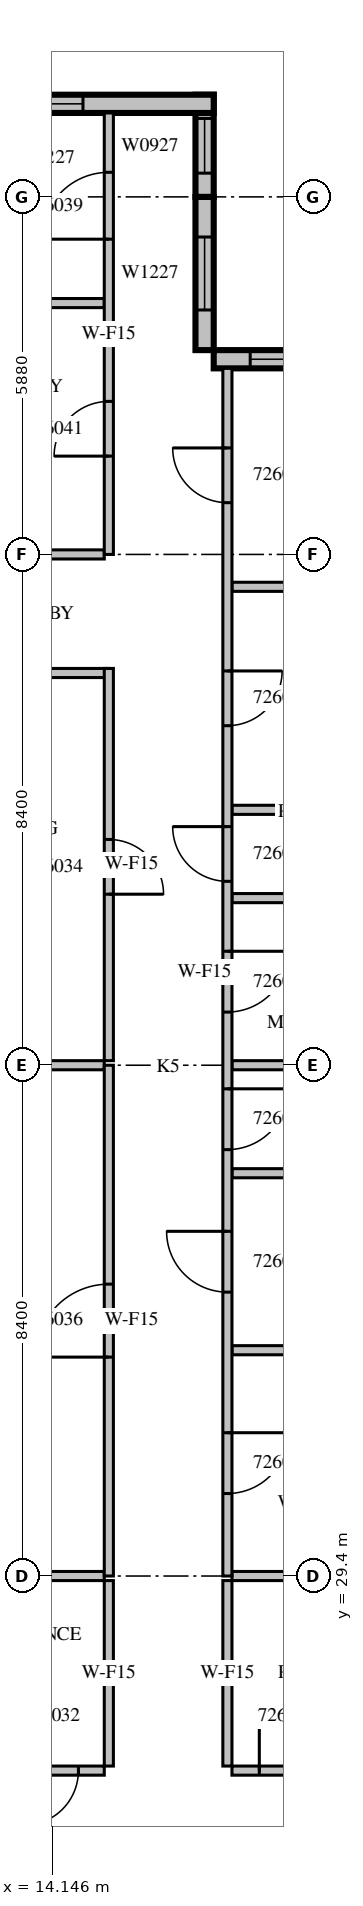
"""IFC4 building model, lengths in metres.
Left out: names, types, materials, properties, quantities, classifications, styles, units other than length and angle.
Written with IfcOpenShell. Run it as: python <this file> out.ifc"""

import sys

from ifc_helpers import new_model, si_unit, direction, frame, frame_2d, origin, place, context, subcontext, project, spatial, rectangle, extrude, source, transform, mapped, element, fill, save


model = new_model("IFC4")
c1 = context("Model", 3, precision=1e-05, world=origin(), true_north=direction((0.0, 1.0)))
c2 = subcontext(c1, "Body", "Model", "MODEL_VIEW")
j1 = project(units=[si_unit("LENGTHUNIT", "METRE"), si_unit("PLANEANGLEUNIT", "RADIAN")], contexts=[c1])
p1 = place(None, origin())
s1 = spatial("IfcSite", under=j1, at=p1, CompositionType="ELEMENT")
p2 = place(p1, origin())
s2 = spatial("IfcBuilding", under=s1, at=p2, CompositionType="ELEMENT")
p3 = place(p2, frame((0.0, 0.0, 120.3)))
s3 = spatial("IfcBuildingStorey", under=s2, at=p3, CompositionType="ELEMENT", Elevation=120.3)
m1 = source(origin(), c2, "Body", "SweptSolid", [
    extrude(rectangle(XDim=4.2, YDim=0.3, at=frame_2d((2.1, 0.0))), origin(), (0.0, 0.0, 1.0), 3.8),
])
p4 = place(p3, frame((21.0, 49.41, 0.0), z_axis=(0.0, 0.0, 1.0), x_axis=(-1.0, 0.0, 0.0)))
e1 = element("IfcWall", 1, at=p4, inside=s3, PredefinedType="STANDARD", context=c2, shape_type="MappedRepresentation", body=[
    mapped(m1, transform((0.0, 0.0, 0.0), scale=1.0)),
])
m2 = source(origin(), c2, "Body", "SweptSolid", [
    extrude(rectangle(XDim=3.0, YDim=2.7, at=frame_2d((1.5, 1.35))), frame((0.0, 0.16, 0.0), z_axis=(0.0, -1.0, 0.0), x_axis=(1.0, 0.0, 0.0)), (0.0, 0.0, 1.0), 0.32),
])
p5 = place(p4, frame((0.6, 0.0, 0.6)))
e2 = element("IfcOpeningElement", 2, at=p5, cuts=e1, PredefinedType="OPENING", context=c2, shape_type="MappedRepresentation", body=[
    mapped(m2, transform((0.0, 0.0, 0.0), scale=1.0)),
])
m3 = source(origin(), c2, "Body", "SweptSolid", [
    extrude(rectangle(XDim=2.52, YDim=0.3, at=frame_2d((1.26, 0.0))), origin(), (0.0, 0.0, 1.0), 3.8),
])
p6 = place(p3, frame((16.65, 49.56, 0.0), z_axis=(0.0, 0.0, 1.0), x_axis=(0.0, 1.0, 0.0)))
e3 = element("IfcWall", 3, at=p6, inside=s3, PredefinedType="STANDARD", context=c2, shape_type="MappedRepresentation", body=[
    mapped(m3, transform((0.0, 0.0, 0.0), scale=1.0)),
])
m4 = source(origin(), c2, "Body", "SweptSolid", [
    extrude(rectangle(XDim=1.2, YDim=2.7, at=frame_2d((0.6, 1.35))), frame((0.0, 0.16, 0.0), z_axis=(0.0, -1.0, 0.0), x_axis=(1.0, 0.0, 0.0)), (0.0, 0.0, 1.0), 0.32),
])
p7 = place(p6, frame((0.66, 0.0, 0.6)))
e4 = element("IfcOpeningElement", 4, at=p7, cuts=e3, PredefinedType="OPENING", context=c2, shape_type="MappedRepresentation", body=[
    mapped(m4, transform((0.0, 0.0, 0.0), scale=1.0)),
])
m5 = source(origin(), c2, "Body", "SweptSolid", [
    extrude(rectangle(XDim=1.68, YDim=0.3, at=frame_2d((0.84, 0.0))), origin(), (0.0, 0.0, 1.0), 3.8),
])
p8 = place(p3, frame((16.65, 52.08, 0.0), z_axis=(0.0, 0.0, 1.0), x_axis=(0.0, 1.0, 0.0)))
e5 = element("IfcWall", 5, at=p8, inside=s3, PredefinedType="STANDARD", context=c2, shape_type="MappedRepresentation", body=[
    mapped(m5, transform((0.0, 0.0, 0.0), scale=1.0)),
])
m6 = source(origin(), c2, "Body", "SweptSolid", [
    extrude(rectangle(XDim=0.9, YDim=2.7, at=frame_2d((0.45, 1.35))), frame((0.0, 0.16, 0.0), z_axis=(0.0, -1.0, 0.0), x_axis=(1.0, 0.0, 0.0)), (0.0, 0.0, 1.0), 0.32),
])
p9 = place(p8, frame((0.39, 0.0, 0.6)))
e6 = element("IfcOpeningElement", 6, at=p9, cuts=e5, PredefinedType="OPENING", context=c2, shape_type="MappedRepresentation", body=[
    mapped(m6, transform((0.0, 0.0, 0.0), scale=1.0)),
])
m7 = source(origin(), c2, "Body", "SweptSolid", [
    extrude(rectangle(XDim=10.5, YDim=0.3, at=frame_2d((5.25, 0.0))), origin(), (0.0, 0.0, 1.0), 3.8),
])
p10 = place(p3, frame((16.8, 53.61, 0.0), z_axis=(0.0, 0.0, 1.0), x_axis=(-1.0, 0.0, 0.0)))
e7 = element("IfcWall", 7, at=p10, inside=s3, PredefinedType="STANDARD", context=c2, shape_type="MappedRepresentation", body=[
    mapped(m7, transform((0.0, 0.0, 0.0), scale=1.0)),
])
p11 = place(p10, frame((2.15, 0.0, 0.6)))
e8 = element("IfcOpeningElement", 8, at=p11, cuts=e7, PredefinedType="OPENING", context=c2, shape_type="MappedRepresentation", body=[
    mapped(m4, transform((0.0, 0.0, 0.0), scale=1.0)),
])
m8 = source(origin(), c2, "Body", "SweptSolid", [
    extrude(rectangle(XDim=1.8, YDim=2.7, at=frame_2d((0.9, 1.35))), frame((0.0, 0.16, 0.0), z_axis=(0.0, -1.0, 0.0), x_axis=(1.0, 0.0, 0.0)), (0.0, 0.0, 1.0), 0.32),
])
p12 = place(p10, frame((8.025, 0.0, 0.6)))
e9 = element("IfcOpeningElement", 9, at=p12, cuts=e7, PredefinedType="OPENING", context=c2, shape_type="MappedRepresentation", body=[
    mapped(m8, transform((0.0, 0.0, 0.0), scale=1.0)),
])
m9 = source(origin(), c2, "Body", "SweptSolid", [
    extrude(rectangle(XDim=8.495, YDim=0.15, at=frame_2d((4.247, 0.0))), origin(), (0.0, 0.0, 1.0), 3.8),
])
p13 = place(p3, frame((6.505, 26.2, 0.0), z_axis=(0.0, 0.0, 1.0), x_axis=(1.0, 0.0, 0.0)))
e10 = element("IfcWall", 10, at=p13, inside=s3, PredefinedType="PARTITIONING", context=c2, shape_type="MappedRepresentation", body=[
    mapped(m9, transform((0.0, 0.0, 0.0), scale=1.0)),
])
m10 = source(origin(), c2, "Body", "SweptSolid", [
    extrude(rectangle(XDim=0.9, YDim=2.1, at=frame_2d((0.45, 1.05))), frame((0.0, 0.085, 0.0), z_axis=(0.0, -1.0, 0.0), x_axis=(1.0, 0.0, 0.0)), (0.0, 0.0, 1.0), 0.17),
])
p14 = place(p13, frame((2.095, 0.0, 0.0)))
e11 = element("IfcOpeningElement", 11, at=p14, cuts=e10, PredefinedType="OPENING", context=c2, shape_type="MappedRepresentation", body=[
    mapped(m10, transform((0.0, 0.0, 0.0), scale=1.0)),
])
p15 = place(p13, frame((7.17, 0.0, 0.0)))
e12 = element("IfcOpeningElement", 12, at=p15, cuts=e10, PredefinedType="OPENING", context=c2, shape_type="MappedRepresentation", body=[
    mapped(m10, transform((0.0, 0.0, 0.0), scale=1.0)),
])
m11 = source(origin(), c2, "Body", "SweptSolid", [
    extrude(rectangle(XDim=3.6, YDim=0.15, at=frame_2d((1.8, 0.0))), origin(), (0.0, 0.0, 1.0), 3.8),
])
p16 = place(p3, frame((17.1, 26.2, 0.0), z_axis=(0.0, 0.0, 1.0), x_axis=(1.0, 0.0, 0.0)))
e13 = element("IfcWall", 13, at=p16, inside=s3, PredefinedType="PARTITIONING", context=c2, shape_type="MappedRepresentation", body=[
    mapped(m11, transform((0.0, 0.0, 0.0), scale=1.0)),
])
p17 = place(p16, frame((0.45, 0.0, 0.0)))
e14 = element("IfcOpeningElement", 14, at=p17, cuts=e13, PredefinedType="OPENING", context=c2, shape_type="MappedRepresentation", body=[
    mapped(m10, transform((0.0, 0.0, 0.0), scale=1.0)),
])
m12 = source(origin(), c2, "Body", "SweptSolid", [
    extrude(rectangle(XDim=3.05, YDim=0.15, at=frame_2d((1.525, 0.0))), origin(), (0.0, 0.0, 1.0), 3.8),
])
for number, where, z_axis, x_axis in (
    (15, (15.075, 26.275, 0.0), (0.0, 0.0, 1.0), (0.0, 1.0, 0.0)),
    (16, (17.025, 29.325, 0.0), (0.0, 0.0, 1.0), (0.0, -1.0, 0.0)),
):
    element("IfcWall", number, at=place(p3, frame(where, z_axis=z_axis, x_axis=x_axis)), inside=s3, PredefinedType="PARTITIONING", context=c2, shape_type="MappedRepresentation", body=[
        mapped(m12, transform((0.0, 0.0, 0.0), scale=1.0)),
    ])
m13 = source(origin(), c2, "Body", "SweptSolid", [
    extrude(rectangle(XDim=3.976, YDim=0.15, at=frame_2d((1.988, 0.0))), origin(), (0.0, 0.0, 1.0), 3.8),
])
p18 = place(p3, frame((15.0, 29.4, 0.0), z_axis=(0.0, 0.0, 1.0), x_axis=(-1.0, 0.0, 0.0)))
e17 = element("IfcWall", 17, at=p18, inside=s3, PredefinedType="PARTITIONING", context=c2, shape_type="MappedRepresentation", body=[
    mapped(m13, transform((0.0, 0.0, 0.0), scale=1.0)),
])
m14 = source(origin(), c2, "Body", "SweptSolid", [
    extrude(rectangle(XDim=2.851, YDim=0.15, at=frame_2d((1.425, 0.0))), origin(), (0.0, 0.0, 1.0), 3.8),
])
p19 = place(p3, frame((19.951, 29.4, 0.0), z_axis=(0.0, 0.0, 1.0), x_axis=(-1.0, 0.0, 0.0)))
e18 = element("IfcWall", 18, at=p19, inside=s3, PredefinedType="PARTITIONING", context=c2, shape_type="MappedRepresentation", body=[
    mapped(m14, transform((0.0, 0.0, 0.0), scale=1.0)),
])
m15 = source(origin(), c2, "Body", "SweptSolid", [
    extrude(rectangle(XDim=3.175, YDim=0.15, at=frame_2d((1.587, 0.0))), origin(), (0.0, 0.0, 1.0), 3.8),
])
p20 = place(p3, frame((15.075, 44.25, 0.0), z_axis=(0.0, 0.0, 1.0), x_axis=(-1.0, 0.0, 0.0)))
e19 = element("IfcWall", 19, at=p20, inside=s3, PredefinedType="PARTITIONING", context=c2, shape_type="MappedRepresentation", body=[
    mapped(m15, transform((0.0, 0.0, 0.0), scale=1.0)),
])
m16 = source(origin(), c2, "Body", "SweptSolid", [
    extrude(rectangle(XDim=6.45, YDim=0.15, at=frame_2d((3.225, 0.0))), origin(), (0.0, 0.0, 1.0), 3.8),
])
p21 = place(p3, frame((15.075, 37.875, 0.0), z_axis=(0.0, 0.0, 1.0), x_axis=(0.0, 1.0, 0.0)))
e20 = element("IfcWall", 20, at=p21, inside=s3, PredefinedType="PARTITIONING", context=c2, shape_type="MappedRepresentation", body=[
    mapped(m16, transform((0.0, 0.0, 0.0), scale=1.0)),
])
p22 = place(p21, frame((2.737, 0.0, 0.0)))
e21 = element("IfcOpeningElement", 21, at=p22, cuts=e20, PredefinedType="OPENING", context=c2, shape_type="MappedRepresentation", body=[
    mapped(m10, transform((0.0, 0.0, 0.0), scale=1.0)),
])
m17 = source(origin(), c2, "Body", "SweptSolid", [
    extrude(rectangle(XDim=3.825, YDim=0.15, at=frame_2d((1.913, 0.0))), origin(), (0.0, 0.0, 1.0), 3.8),
])
for number, where, z_axis, x_axis in (
    (22, (15.0, 37.8, 0.0), (0.0, 0.0, 1.0), (-1.0, 0.0, 0.0)),
    (23, (15.0, 50.334, 0.0), (0.0, 0.0, 1.0), (-1.0, 0.0, 0.0)),
    (24, (15.0, 46.2, 0.0), (0.0, 0.0, 1.0), (-1.0, 0.0, 0.0)),
):
    element("IfcWall", number, at=place(p3, frame(where, z_axis=z_axis, x_axis=x_axis)), inside=s3, PredefinedType="PARTITIONING", context=c2, shape_type="MappedRepresentation", body=[
        mapped(m17, transform((0.0, 0.0, 0.0), scale=1.0)),
    ])
for number, where, z_axis, x_axis in (
    (25, (17.1, 33.113, 0.0), (0.0, 0.0, 1.0), (1.0, 0.0, 0.0)),
    (26, (17.1, 36.024, 0.0), (0.0, 0.0, 1.0), (1.0, 0.0, 0.0)),
    (27, (17.1, 40.548, 0.0), (0.0, 0.0, 1.0), (1.0, 0.0, 0.0)),
    (28, (17.1, 45.667, 0.0), (0.0, 0.0, 1.0), (1.0, 0.0, 0.0)),
):
    element("IfcWall", number, at=place(p3, frame(where, z_axis=z_axis, x_axis=x_axis)), inside=s3, PredefinedType="PARTITIONING", context=c2, shape_type="MappedRepresentation", body=[
        mapped(m11, transform((0.0, 0.0, 0.0), scale=1.0)),
    ])
p23 = place(p3, frame((19.951, 37.8, 0.0), z_axis=(0.0, 0.0, 1.0), x_axis=(-1.0, 0.0, 0.0)))
e29 = element("IfcWall", 29, at=p23, inside=s3, PredefinedType="PARTITIONING", context=c2, shape_type="MappedRepresentation", body=[
    mapped(m14, transform((0.0, 0.0, 0.0), scale=1.0)),
])
p24 = place(p3, frame((20.7, 42.0, 0.0), z_axis=(0.0, 0.0, 1.0), x_axis=(-1.0, 0.0, 0.0)))
e30 = element("IfcWall", 30, at=p24, inside=s3, PredefinedType="PARTITIONING", context=c2, shape_type="MappedRepresentation", body=[
    mapped(m11, transform((0.0, 0.0, 0.0), scale=1.0)),
])
m18 = source(origin(), c2, "Body", "SweptSolid", [
    extrude(rectangle(XDim=8.4, YDim=0.15, at=frame_2d((4.2, 0.0))), origin(), (0.0, 0.0, 1.0), 3.8),
])
p25 = place(p3, frame((15.075, 29.4, 0.0), z_axis=(0.0, 0.0, 1.0), x_axis=(0.0, 1.0, 0.0)))
e31 = element("IfcWall", 31, at=p25, inside=s3, PredefinedType="PARTITIONING", context=c2, shape_type="MappedRepresentation", body=[
    mapped(m18, transform((0.0, 0.0, 0.0), scale=1.0)),
])
m19 = source(origin(), c2, "Body", "SweptSolid", [
    extrude(rectangle(XDim=1.2, YDim=2.1, at=frame_2d((0.6, 1.05))), frame((0.0, 0.085, 0.0), z_axis=(0.0, -1.0, 0.0), x_axis=(1.0, 0.0, 0.0)), (0.0, 0.0, 1.0), 0.17),
])
p26 = place(p25, frame((3.6, 0.0, 0.0)))
e32 = element("IfcOpeningElement", 32, at=p26, cuts=e31, PredefinedType="OPENING", context=c2, shape_type="MappedRepresentation", body=[
    mapped(m19, transform((0.0, 0.0, 0.0), scale=1.0)),
])
m20 = source(origin(), c2, "Body", "SweptSolid", [
    extrude(rectangle(XDim=7.26, YDim=0.15, at=frame_2d((3.63, 0.0))), origin(), (0.0, 0.0, 1.0), 3.8),
])
p27 = place(p3, frame((15.075, 46.2, 0.0), z_axis=(0.0, 0.0, 1.0), x_axis=(0.0, 1.0, 0.0)))
e33 = element("IfcWall", 33, at=p27, inside=s3, PredefinedType="PARTITIONING", context=c2, shape_type="MappedRepresentation", body=[
    mapped(m20, transform((0.0, 0.0, 0.0), scale=1.0)),
])
m21 = source(origin(), c2, "Body", "SweptSolid", [
    extrude(rectangle(XDim=1.1, YDim=2.1, at=frame_2d((0.55, 1.05))), frame((0.0, 0.085, 0.0), z_axis=(0.0, -1.0, 0.0), x_axis=(1.0, 0.0, 0.0)), (0.0, 0.0, 1.0), 0.17),
])
p28 = place(p27, frame((5.184, 0.0, 0.0)))
e34 = element("IfcOpeningElement", 34, at=p28, cuts=e33, PredefinedType="OPENING", context=c2, shape_type="MappedRepresentation", body=[
    mapped(m21, transform((0.0, 0.0, 0.0), scale=1.0)),
])
p29 = place(p27, frame((1.617, 0.0, 0.0)))
e35 = element("IfcOpeningElement", 35, at=p29, cuts=e33, PredefinedType="OPENING", context=c2, shape_type="MappedRepresentation", body=[
    mapped(m10, transform((0.0, 0.0, 0.0), scale=1.0)),
])
m22 = source(origin(), c2, "Body", "SweptSolid", [
    extrude(rectangle(XDim=19.86, YDim=0.15, at=frame_2d((9.93, 0.0))), origin(), (0.0, 0.0, 1.0), 3.8),
])
p30 = place(p3, frame((17.025, 49.26, 0.0), z_axis=(0.0, 0.0, 1.0), x_axis=(0.0, -1.0, 0.0)))
e36 = element("IfcWall", 36, at=p30, inside=s3, PredefinedType="PARTITIONING", context=c2, shape_type="MappedRepresentation", body=[
    mapped(m22, transform((0.0, 0.0, 0.0), scale=1.0)),
])
m23 = source(origin(), c2, "Body", "SweptSolid", [
    extrude(rectangle(XDim=1.0, YDim=2.1, at=frame_2d((0.5, 1.05))), frame((0.0, 0.085, 0.0), z_axis=(0.0, -1.0, 0.0), x_axis=(1.0, 0.0, 0.0)), (0.0, 0.0, 1.0), 0.17),
])
p31 = place(p30, frame((17.503, 0.0, 0.0)))
e37 = element("IfcOpeningElement", 37, at=p31, cuts=e36, PredefinedType="OPENING", context=c2, shape_type="MappedRepresentation", body=[
    mapped(m23, transform((0.0, 0.0, 0.0), scale=1.0)),
])
p32 = place(p30, frame((14.191, 0.0, 0.0)))
e38 = element("IfcOpeningElement", 38, at=p32, cuts=e36, PredefinedType="OPENING", context=c2, shape_type="MappedRepresentation", body=[
    mapped(m23, transform((0.0, 0.0, 0.0), scale=1.0)),
])
p33 = place(p30, frame((11.848, 0.0, 0.0)))
e39 = element("IfcOpeningElement", 39, at=p33, cuts=e36, PredefinedType="OPENING", context=c2, shape_type="MappedRepresentation", body=[
    mapped(m23, transform((0.0, 0.0, 0.0), scale=1.0)),
])
p34 = place(p30, frame((9.586, 0.0, 0.0)))
e40 = element("IfcOpeningElement", 40, at=p34, cuts=e36, PredefinedType="OPENING", context=c2, shape_type="MappedRepresentation", body=[
    mapped(m23, transform((0.0, 0.0, 0.0), scale=1.0)),
])
p35 = place(p30, frame((7.536, 0.0, 0.0)))
e41 = element("IfcOpeningElement", 41, at=p35, cuts=e36, PredefinedType="OPENING", context=c2, shape_type="MappedRepresentation", body=[
    mapped(m10, transform((0.0, 0.0, 0.0), scale=1.0)),
])
p36 = place(p30, frame((4.976, 0.0, 0.0)))
e42 = element("IfcOpeningElement", 42, at=p36, cuts=e36, PredefinedType="OPENING", context=c2, shape_type="MappedRepresentation", body=[
    mapped(m10, transform((0.0, 0.0, 0.0), scale=1.0)),
])
p37 = place(p30, frame((1.309, 0.0, 0.0)))
e43 = element("IfcOpeningElement", 43, at=p37, cuts=e36, PredefinedType="OPENING", context=c2, shape_type="MappedRepresentation", body=[
    mapped(m10, transform((0.0, 0.0, 0.0), scale=1.0)),
])
m24 = source(origin(), c2, "Body", "SweptSolid", [
    extrude(rectangle(XDim=3.0, YDim=2.7, at=frame_2d((1.5, 1.35))), frame((0.0, 0.03, 0.0), z_axis=(0.0, -1.0, 0.0), x_axis=(1.0, 0.0, 0.0)), (0.0, 0.0, 1.0), 0.06),
])
p38 = place(p5, origin())
e44 = element("IfcWindow", 44, at=p38, inside=s3, PartitioningType="SINGLE_PANEL", PredefinedType="WINDOW", context=c2, shape_type="MappedRepresentation", body=[
    mapped(m24, transform((0.0, 0.0, 0.0), scale=1.0)),
])
fill(e2, e44)
m25 = source(origin(), c2, "Body", "SweptSolid", [
    extrude(rectangle(XDim=1.2, YDim=2.7, at=frame_2d((0.6, 1.35))), frame((0.0, 0.03, 0.0), z_axis=(0.0, -1.0, 0.0), x_axis=(1.0, 0.0, 0.0)), (0.0, 0.0, 1.0), 0.06),
])
p39 = place(p7, origin())
e45 = element("IfcWindow", 45, at=p39, inside=s3, PartitioningType="SINGLE_PANEL", PredefinedType="WINDOW", context=c2, shape_type="MappedRepresentation", body=[
    mapped(m25, transform((0.0, 0.0, 0.0), scale=1.0)),
])
fill(e4, e45)
m26 = source(origin(), c2, "Body", "SweptSolid", [
    extrude(rectangle(XDim=0.9, YDim=2.7, at=frame_2d((0.45, 1.35))), frame((0.0, 0.03, 0.0), z_axis=(0.0, -1.0, 0.0), x_axis=(1.0, 0.0, 0.0)), (0.0, 0.0, 1.0), 0.06),
])
p40 = place(p9, origin())
e46 = element("IfcWindow", 46, at=p40, inside=s3, PartitioningType="SINGLE_PANEL", PredefinedType="WINDOW", context=c2, shape_type="MappedRepresentation", body=[
    mapped(m26, transform((0.0, 0.0, 0.0), scale=1.0)),
])
fill(e6, e46)
p41 = place(p11, origin())
e47 = element("IfcWindow", 47, at=p41, inside=s3, PartitioningType="SINGLE_PANEL", PredefinedType="WINDOW", context=c2, shape_type="MappedRepresentation", body=[
    mapped(m25, transform((0.0, 0.0, 0.0), scale=1.0)),
])
fill(e8, e47)
m27 = source(origin(), c2, "Body", "SweptSolid", [
    extrude(rectangle(XDim=0.9, YDim=2.1, at=frame_2d((0.45, 1.05))), frame((0.0, 0.025, 0.0), z_axis=(0.0, -1.0, 0.0), x_axis=(1.0, 0.0, 0.0)), (0.0, 0.0, 1.0), 0.05),
])
p42 = place(p15, origin())
e48 = element("IfcDoor", 48, at=p42, inside=s3, OperationType="SINGLE_SWING_RIGHT", PredefinedType="DOOR", context=c2, shape_type="MappedRepresentation", body=[
    mapped(m27, transform((0.0, 0.0, 0.0), scale=1.0)),
])
fill(e12, e48)
p43 = place(p17, origin())
e49 = element("IfcDoor", 49, at=p43, inside=s3, OperationType="SINGLE_SWING_LEFT", PredefinedType="DOOR", context=c2, shape_type="MappedRepresentation", body=[
    mapped(m27, transform((0.0, 0.0, 0.0), scale=1.0)),
])
fill(e14, e49)
p44 = place(p22, origin())
e50 = element("IfcDoor", 50, at=p44, inside=s3, OperationType="SINGLE_SWING_RIGHT", PredefinedType="DOOR", context=c2, shape_type="MappedRepresentation", body=[
    mapped(m27, transform((0.0, 0.0, 0.0), scale=1.0)),
])
fill(e21, e50)
m28 = source(origin(), c2, "Body", "SweptSolid", [
    extrude(rectangle(XDim=1.2, YDim=2.1, at=frame_2d((0.6, 1.05))), frame((0.0, 0.025, 0.0), z_axis=(0.0, -1.0, 0.0), x_axis=(1.0, 0.0, 0.0)), (0.0, 0.0, 1.0), 0.05),
])
p45 = place(p26, origin())
e51 = element("IfcDoor", 51, at=p45, inside=s3, OperationType="SINGLE_SWING_LEFT", PredefinedType="DOOR", context=c2, shape_type="MappedRepresentation", body=[
    mapped(m28, transform((0.0, 0.0, 0.0), scale=1.0)),
])
fill(e32, e51)
m29 = source(origin(), c2, "Body", "SweptSolid", [
    extrude(rectangle(XDim=1.1, YDim=2.1, at=frame_2d((0.55, 1.05))), frame((0.0, 0.025, 0.0), z_axis=(0.0, -1.0, 0.0), x_axis=(1.0, 0.0, 0.0)), (0.0, 0.0, 1.0), 0.05),
])
p46 = place(p28, origin())
e52 = element("IfcDoor", 52, at=p46, inside=s3, OperationType="SINGLE_SWING_LEFT", PredefinedType="DOOR", context=c2, shape_type="MappedRepresentation", body=[
    mapped(m29, transform((0.0, 0.0, 0.0), scale=1.0)),
])
fill(e34, e52)
p47 = place(p29, origin())
e53 = element("IfcDoor", 53, at=p47, inside=s3, OperationType="SINGLE_SWING_LEFT", PredefinedType="DOOR", context=c2, shape_type="MappedRepresentation", body=[
    mapped(m27, transform((0.0, 0.0, 0.0), scale=1.0)),
])
fill(e35, e53)
m30 = source(origin(), c2, "Body", "SweptSolid", [
    extrude(rectangle(XDim=1.0, YDim=2.1, at=frame_2d((0.5, 1.05))), frame((0.0, 0.025, 0.0), z_axis=(0.0, -1.0, 0.0), x_axis=(1.0, 0.0, 0.0)), (0.0, 0.0, 1.0), 0.05),
])
p48 = place(p31, origin())
e54 = element("IfcDoor", 54, at=p48, inside=s3, OperationType="SINGLE_SWING_LEFT", PredefinedType="DOOR", context=c2, shape_type="MappedRepresentation", body=[
    mapped(m30, transform((0.0, 0.0, 0.0), scale=1.0)),
])
fill(e37, e54)
p49 = place(p32, origin())
e55 = element("IfcDoor", 55, at=p49, inside=s3, OperationType="SINGLE_SWING_RIGHT", PredefinedType="DOOR", context=c2, shape_type="MappedRepresentation", body=[
    mapped(m30, transform((0.0, 0.0, 0.0), scale=1.0)),
])
fill(e38, e55)
p50 = place(p33, origin())
e56 = element("IfcDoor", 56, at=p50, inside=s3, OperationType="SINGLE_SWING_LEFT", PredefinedType="DOOR", context=c2, shape_type="MappedRepresentation", body=[
    mapped(m30, transform((0.0, 0.0, 0.0), scale=1.0)),
])
fill(e39, e56)
p51 = place(p34, origin())
e57 = element("IfcDoor", 57, at=p51, inside=s3, OperationType="SINGLE_SWING_LEFT", PredefinedType="DOOR", context=c2, shape_type="MappedRepresentation", body=[
    mapped(m30, transform((0.0, 0.0, 0.0), scale=1.0)),
])
fill(e40, e57)
p52 = place(p35, origin())
e58 = element("IfcDoor", 58, at=p52, inside=s3, OperationType="SINGLE_SWING_RIGHT", PredefinedType="DOOR", context=c2, shape_type="MappedRepresentation", body=[
    mapped(m27, transform((0.0, 0.0, 0.0), scale=1.0)),
])
fill(e41, e58)
p53 = place(p36, origin())
e59 = element("IfcDoor", 59, at=p53, inside=s3, OperationType="SINGLE_SWING_LEFT", PredefinedType="DOOR", context=c2, shape_type="MappedRepresentation", body=[
    mapped(m27, transform((0.0, 0.0, 0.0), scale=1.0)),
])
fill(e42, e59)
p54 = place(p37, origin())
e60 = element("IfcDoor", 60, at=p54, inside=s3, OperationType="SINGLE_SWING_RIGHT", PredefinedType="DOOR", context=c2, shape_type="MappedRepresentation", body=[
    mapped(m27, transform((0.0, 0.0, 0.0), scale=1.0)),
])
fill(e43, e60)
save(model, sys.argv[1])
